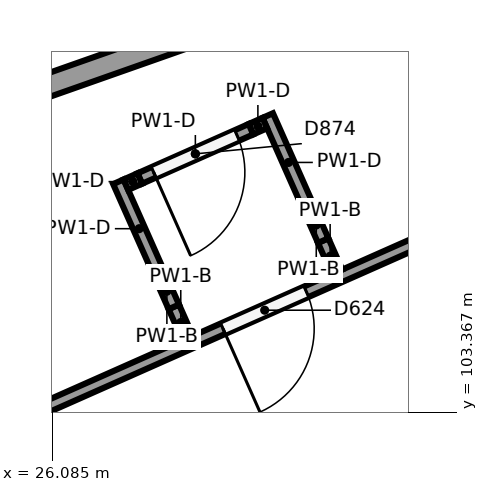
"""IFC4 building model, lengths in metres.
Left out: names, types, materials, properties, quantities, classifications, styles, units other than length and angle.
Written with IfcOpenShell. Run it as: python <this file> out.ifc"""

import sys

from ifc_helpers import new_model, si_unit, direction, frame, frame_2d, origin, place, context, subcontext, project, spatial, rectangle, extrude, element, fill, save


model = new_model("IFC4")
c1 = context("Model", 3, precision=1e-05, world=origin(), true_north=direction((0.0, 1.0)))
c2 = subcontext(c1, "Body", "Model", "MODEL_VIEW")
j1 = project(units=[si_unit("LENGTHUNIT", "METRE"), si_unit("PLANEANGLEUNIT", "RADIAN")], contexts=[c1])
p1 = place(None, origin())
s1 = spatial("IfcSite", under=j1, at=p1, CompositionType="ELEMENT")
p2 = place(p1, origin())
s2 = spatial("IfcBuilding", under=s1, at=p2, CompositionType="ELEMENT")
p3 = place(p2, origin())
s3 = spatial("IfcBuildingStorey", under=s2, at=p3, CompositionType="ELEMENT", Elevation=0.0)
p4 = place(p3, frame((23.377, 106.733, 0.0), z_axis=(0.0, 0.0, 1.0), x_axis=(0.943227349695, 0.332147808646, 0.0)))
e1 = element("IfcWall", 1, at=p4, inside=s3, PredefinedType="SOLIDWALL", context=c2, shape_type="SweptSolid", body=[
    extrude(rectangle(XDim=5.528, YDim=0.3, at=frame_2d((2.764, 0.0))), origin(), (0.0, 0.0, 1.0), 4.85),
])
p5 = place(p3, frame((23.411, 98.782, 0.0), z_axis=(0.0, 0.0, 1.0), x_axis=(0.914140506485, 0.405397501722, 0.0)))
e2 = element("IfcWall", 2, at=p5, inside=s3, PredefinedType="SOLIDWALL", context=c2, shape_type="SweptSolid", body=[
    extrude(rectangle(XDim=15.625, YDim=0.3, at=frame_2d((7.812, 0.0))), origin(), (0.0, 0.0, 1.0), 4.85),
])
p6 = place(p3, frame((38.388, 108.925, 0.0), z_axis=(0.0, 0.0, 1.0), x_axis=(-0.914139898556, -0.405398872555, 0.0)))
e3 = element("IfcWall", 3, at=p6, inside=s3, PredefinedType="PARTITIONING", context=c2, shape_type="SweptSolid", body=[
    extrude(rectangle(XDim=13.846, YDim=0.15, at=frame_2d((6.923, 0.0))), origin(), (0.0, 0.0, 1.0), 4.85),
])
p7 = place(p6, frame((9.8, 0.0, 0.0)))
e4 = element("IfcOpeningElement", 4, at=p7, cuts=e3, PredefinedType="OPENING", context=c2, shape_type="SweptSolid", body=[
    extrude(rectangle(XDim=1.2, YDim=2.1, at=frame_2d((0.6, 1.05))), frame((0.0, 0.085, 0.0), z_axis=(0.0, -1.0, 0.0), x_axis=(1.0, 0.0, 0.0)), (0.0, 0.0, 1.0), 0.17),
])
p8 = place(p3, frame((29.833, 105.213, 0.0), z_axis=(0.0, 0.0, 1.0), x_axis=(-0.405735800004, 0.913990405089, 0.0)))
e5 = element("IfcWall", 5, at=p8, inside=s3, PredefinedType="PARTITIONING", context=c2, shape_type="SweptSolid", body=[
    extrude(rectangle(XDim=0.45, YDim=0.15, at=frame_2d((0.225, 0.0))), origin(), (0.0, 0.0, 1.0), 4.85),
])
p9 = place(p3, frame((29.651, 105.625, 0.0), z_axis=(0.0, 0.0, 1.0), x_axis=(-0.405282518143, 0.914191490054, 0.0)))
e6 = element("IfcWall", 6, at=p9, inside=s3, PredefinedType="PARTITIONING", context=c2, shape_type="SweptSolid", body=[
    extrude(rectangle(XDim=0.45, YDim=0.15, at=frame_2d((0.225, 0.0))), origin(), (0.0, 0.0, 1.0), 4.85),
])
p10 = place(p3, frame((29.469, 106.036, 0.0), z_axis=(0.0, 0.0, 1.0), x_axis=(-0.405282518143, 0.914191490054, 0.0)))
e7 = element("IfcWall", 7, at=p10, inside=s3, PredefinedType="PARTITIONING", context=c2, shape_type="SweptSolid", body=[
    extrude(rectangle(XDim=1.35, YDim=0.15, at=frame_2d((0.675, 0.0))), origin(), (0.0, 0.0, 1.0), 6.1),
])
p11 = place(p3, frame((27.868, 104.342, 0.0), z_axis=(0.0, 0.0, 1.0), x_axis=(-0.405937043024, 0.913901043385, 0.0)))
e8 = element("IfcWall", 8, at=p11, inside=s3, PredefinedType="PARTITIONING", context=c2, shape_type="SweptSolid", body=[
    extrude(rectangle(XDim=0.45, YDim=0.15, at=frame_2d((0.225, 0.0))), origin(), (0.0, 0.0, 1.0), 4.85),
])
p12 = place(p3, frame((27.686, 104.753, 0.0), z_axis=(0.0, 0.0, 1.0), x_axis=(-0.405081591232, 0.914280539247, 0.0)))
e9 = element("IfcWall", 9, at=p12, inside=s3, PredefinedType="PARTITIONING", context=c2, shape_type="SweptSolid", body=[
    extrude(rectangle(XDim=0.45, YDim=0.15, at=frame_2d((0.225, 0.0))), origin(), (0.0, 0.0, 1.0), 4.85),
])
p13 = place(p3, frame((27.503, 105.164, 0.0), z_axis=(0.0, 0.0, 1.0), x_axis=(-0.405500676078, 0.914094744379, 0.0)))
e10 = element("IfcWall", 10, at=p13, inside=s3, PredefinedType="PARTITIONING", context=c2, shape_type="SweptSolid", body=[
    extrude(rectangle(XDim=1.35, YDim=0.15, at=frame_2d((0.675, 0.0))), origin(), (0.0, 0.0, 1.0), 6.1),
])
p14 = place(p3, frame((28.883, 107.171, 0.0), z_axis=(0.0, 0.0, 1.0), x_axis=(-0.914213764774, -0.405232269566, 0.0)))
e11 = element("IfcWall", 11, at=p14, inside=s3, PredefinedType="PARTITIONING", context=c2, shape_type="SweptSolid", body=[
    extrude(rectangle(XDim=0.2, YDim=0.15, at=frame_2d((0.1, 0.0))), origin(), (0.0, 0.0, 1.0), 6.1),
])
p15 = place(p3, frame((28.7, 107.09, 0.0), z_axis=(0.0, 0.0, 1.0), x_axis=(-0.914107077827, -0.405472872418, 0.0)))
e12 = element("IfcWall", 12, at=p15, inside=s3, PredefinedType="PARTITIONING", context=c2, shape_type="SweptSolid", body=[
    extrude(rectangle(XDim=1.6, YDim=0.15, at=frame_2d((0.8, 0.0))), origin(), (0.0, 0.0, 1.0), 6.1),
])
p16 = place(p15, frame((0.2, 0.0, 0.0)))
e13 = element("IfcOpeningElement", 13, at=p16, cuts=e12, PredefinedType="OPENING", context=c2, shape_type="SweptSolid", body=[
    extrude(rectangle(XDim=1.2, YDim=2.1, at=frame_2d((0.6, 1.05))), frame((0.0, 0.085, 0.0), z_axis=(0.0, -1.0, 0.0), x_axis=(1.0, 0.0, 0.0)), (0.0, 0.0, 1.0), 0.17),
])
p17 = place(p3, frame((27.238, 106.441, 0.0), z_axis=(0.0, 0.0, 1.0), x_axis=(-0.914213764774, -0.405232269566, 0.0)))
e14 = element("IfcWall", 14, at=p17, inside=s3, PredefinedType="PARTITIONING", context=c2, shape_type="SweptSolid", body=[
    extrude(rectangle(XDim=0.2, YDim=0.15, at=frame_2d((0.1, 0.0))), origin(), (0.0, 0.0, 1.0), 6.1),
])
p18 = place(p7, origin())
e15 = element("IfcDoor", 15, at=p18, inside=s3, OperationType="SINGLE_SWING_RIGHT", PredefinedType="DOOR", context=c2, shape_type="SweptSolid", body=[
    extrude(rectangle(XDim=1.2, YDim=2.1, at=frame_2d((0.6, 1.05))), frame((0.0, 0.025, 0.0), z_axis=(0.0, -1.0, 0.0), x_axis=(1.0, 0.0, 0.0)), (0.0, 0.0, 1.0), 0.05),
])
fill(e4, e15)
p19 = place(p16, origin())
e16 = element("IfcDoor", 16, at=p19, inside=s3, OperationType="SINGLE_SWING_RIGHT", PredefinedType="DOOR", context=c2, shape_type="SweptSolid", body=[
    extrude(rectangle(XDim=1.2, YDim=2.1, at=frame_2d((0.6, 1.05))), frame((0.0, 0.025, 0.0), z_axis=(0.0, -1.0, 0.0), x_axis=(1.0, 0.0, 0.0)), (0.0, 0.0, 1.0), 0.05),
])
fill(e13, e16)
save(model, sys.argv[1])
